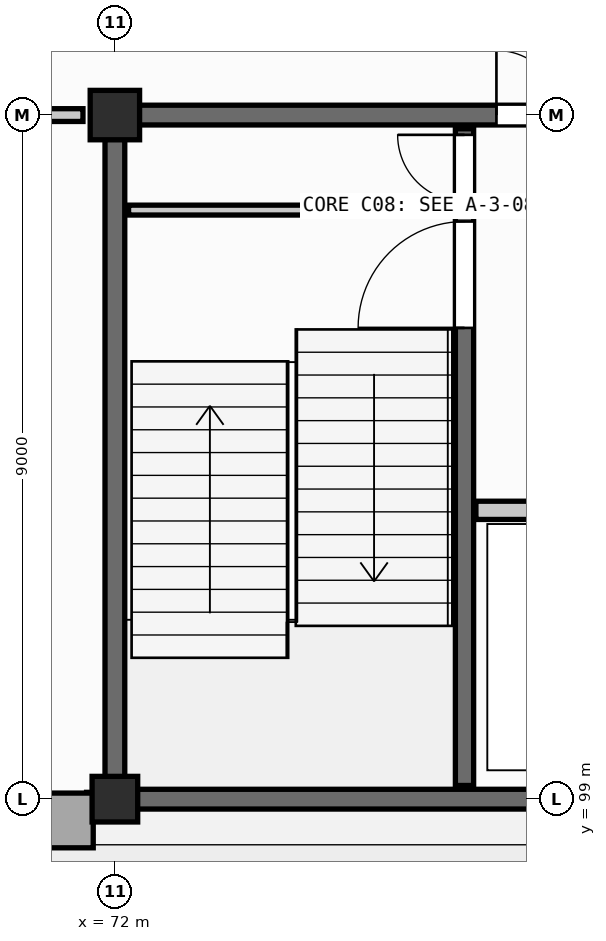
"""IFC4 building model, lengths in metres.
Left out: names, types, materials, properties, quantities, classifications, styles, units other than length and angle.
Written with IfcOpenShell. Run it as: python <this file> out.ifc"""

import sys

from ifc_helpers import new_model, si_unit, direction, frame, frame_2d, origin, origin_2d, place, context, subcontext, project, spatial, rectangle, extrude, element, fill, save


model = new_model("IFC4")
c1 = context("Model", 3, precision=1e-05, world=origin(), true_north=direction((0.0, 1.0)))
c2 = subcontext(c1, "Body", "Model", "MODEL_VIEW")
j1 = project(units=[si_unit("LENGTHUNIT", "METRE"), si_unit("PLANEANGLEUNIT", "RADIAN")], contexts=[c1])
p1 = place(None, origin())
s1 = spatial("IfcSite", under=j1, at=p1, CompositionType="ELEMENT")
p2 = place(p1, origin())
s2 = spatial("IfcBuilding", under=s1, at=p2, CompositionType="ELEMENT")
p3 = place(p2, frame((0.0, 0.0, 9.0)))
s3 = spatial("IfcBuildingStorey", under=s2, at=p3, CompositionType="ELEMENT", Elevation=9.0)
p4 = place(p3, frame((72.0, 99.0, 0.0), z_axis=(0.0, 0.0, 1.0), x_axis=(1.0, 0.0, 0.0)))
e1 = element("IfcColumn", 1, at=p4, inside=s3, PredefinedType="COLUMN", context=c2, shape_type="SweptSolid", body=[
    extrude(rectangle(XDim=0.6, YDim=0.6, at=origin_2d()), origin(), (0.0, 0.0, 1.0), 4.2),
])
p5 = place(p3, frame((72.0, 108.0, 0.0), z_axis=(0.0, 0.0, 1.0), x_axis=(1.0, 0.0, 0.0)))
e2 = element("IfcColumn", 2, at=p5, inside=s3, PredefinedType="COLUMN", context=c2, shape_type="SweptSolid", body=[
    extrude(rectangle(XDim=0.65, YDim=0.65, at=origin_2d()), origin(), (0.0, 0.0, 1.0), 4.2),
])
p6 = place(p3, frame((72.295, 99.0, 0.0), z_axis=(0.0, 0.0, 1.0), x_axis=(1.0, 0.0, 0.0)))
e3 = element("IfcWall", 3, at=p6, inside=s3, PredefinedType="SHEAR", context=c2, shape_type="SweptSolid", body=[
    extrude(rectangle(XDim=7.41, YDim=0.26, at=frame_2d((3.705, 0.0))), origin(), (0.0, 0.0, 1.0), 3.955),
])
p7 = place(p3, frame((72.32, 108.0, 0.0), z_axis=(0.0, 0.0, 1.0), x_axis=(1.0, 0.0, 0.0)))
e4 = element("IfcWall", 4, at=p7, inside=s3, PredefinedType="SHEAR", context=c2, shape_type="SweptSolid", body=[
    extrude(rectangle(XDim=7.36, YDim=0.26, at=frame_2d((3.68, 0.0))), origin(), (0.0, 0.0, 1.0), 3.955),
])
p8 = place(p7, frame((4.7, 0.0, 0.0)))
e5 = element("IfcOpeningElement", 5, at=p8, cuts=e4, PredefinedType="OPENING", context=c2, shape_type="SweptSolid", body=[
    extrude(rectangle(XDim=1.7, YDim=2.25, at=frame_2d((0.85, 1.125))), frame((0.0, 0.14, 0.0), z_axis=(0.0, -1.0, 0.0), x_axis=(1.0, 0.0, 0.0)), (0.0, 0.0, 1.0), 0.28),
])
p9 = place(p3, frame((72.0, 99.295, 0.0), z_axis=(0.0, 0.0, 1.0), x_axis=(0.0, 1.0, 0.0)))
e6 = element("IfcWall", 6, at=p9, inside=s3, PredefinedType="SHEAR", context=c2, shape_type="SweptSolid", body=[
    extrude(rectangle(XDim=8.385, YDim=0.26, at=frame_2d((4.192, 0.0))), origin(), (0.0, 0.0, 1.0), 3.955),
])
p10 = place(p3, frame((76.6, 99.18, 0.0), z_axis=(0.0, 0.0, 1.0), x_axis=(0.0, 1.0, 0.0)))
e7 = element("IfcWall", 7, at=p10, inside=s3, PredefinedType="SHEAR", context=c2, shape_type="SweptSolid", body=[
    extrude(rectangle(XDim=8.64, YDim=0.24, at=frame_2d((4.32, 0.0))), origin(), (0.0, 0.0, 1.0), 3.955),
])
p11 = place(p10, frame((6.02, 0.0, 0.0)))
e8 = element("IfcOpeningElement", 8, at=p11, cuts=e7, PredefinedType="OPENING", context=c2, shape_type="SweptSolid", body=[
    extrude(rectangle(XDim=1.4, YDim=2.2, at=frame_2d((0.7, 1.1))), frame((0.0, 0.13, 0.0), z_axis=(0.0, -1.0, 0.0), x_axis=(1.0, 0.0, 0.0)), (0.0, 0.0, 1.0), 0.26),
])
p12 = place(p10, frame((7.68, 0.0, 0.0)))
e9 = element("IfcOpeningElement", 9, at=p12, cuts=e7, PredefinedType="OPENING", context=c2, shape_type="SweptSolid", body=[
    extrude(rectangle(XDim=0.88, YDim=2.02, at=frame_2d((0.44, 1.01))), frame((0.0, 0.13, 0.0), z_axis=(0.0, -1.0, 0.0), x_axis=(1.0, 0.0, 0.0)), (0.0, 0.0, 1.0), 0.26),
])
p13 = place(p3, frame((72.18, 106.75, 0.0), z_axis=(0.0, 0.0, 1.0), x_axis=(1.0, 0.0, 0.0)))
e10 = element("IfcWall", 10, at=p13, inside=s3, PredefinedType="PARTITIONING", context=c2, shape_type="SweptSolid", body=[
    extrude(rectangle(XDim=4.28, YDim=0.13, at=frame_2d((2.14, 0.0))), origin(), (0.0, 0.0, 1.0), 3.305),
])
p14 = place(p3, frame((76.75, 102.8, 0.0), z_axis=(0.0, 0.0, 1.0), x_axis=(1.0, 0.0, 0.0)))
e11 = element("IfcWall", 11, at=p14, inside=s3, PredefinedType="SHEAR", context=c2, shape_type="SweptSolid", body=[
    extrude(rectangle(XDim=3.07, YDim=0.24, at=frame_2d((1.535, 0.0))), origin(), (0.0, 0.0, 1.0), 3.305),
])
p15 = place(p14, frame((1.035, 0.0, 0.0)))
e12 = element("IfcOpeningElement", 12, at=p15, cuts=e11, PredefinedType="OPENING", context=c2, shape_type="SweptSolid", body=[
    extrude(rectangle(XDim=1.0, YDim=2.15, at=frame_2d((0.5, 1.075))), frame((0.0, 0.13, 0.0), z_axis=(0.0, -1.0, 0.0), x_axis=(1.0, 0.0, 0.0)), (0.0, 0.0, 1.0), 0.26),
])
p16 = place(p3, frame((64.82, 108.0, 0.0), z_axis=(0.0, 0.0, 1.0), x_axis=(1.0, 0.0, 0.0)))
e13 = element("IfcWall", 13, at=p16, inside=s3, PredefinedType="PARTITIONING", context=c2, shape_type="SweptSolid", body=[
    extrude(rectangle(XDim=6.76, YDim=0.168, at=frame_2d((3.38, 0.0))), origin(), (0.0, 0.0, 1.0), 3.05),
])
p17 = place(p16, frame((2.85, 0.0, 0.0)))
e14 = element("IfcOpeningElement", 14, at=p17, cuts=e13, PredefinedType="OPENING", context=c2, shape_type="SweptSolid", body=[
    extrude(rectangle(XDim=1.06, YDim=2.17, at=frame_2d((0.53, 1.085))), frame((0.0, 0.094, 0.0), z_axis=(0.0, -1.0, 0.0), x_axis=(1.0, 0.0, 0.0)), (0.0, 0.0, 1.0), 0.188),
])
p18 = place(p11, origin())
e15 = element("IfcDoor", 15, at=p18, inside=s3, OperationType="SINGLE_SWING_LEFT", PredefinedType="DOOR", context=c2, shape_type="SweptSolid", body=[
    extrude(rectangle(XDim=1.4, YDim=2.2, at=frame_2d((0.7, 1.1))), frame((0.0, 0.025, 0.0), z_axis=(0.0, -1.0, 0.0), x_axis=(1.0, 0.0, 0.0)), (0.0, 0.0, 1.0), 0.05),
])
fill(e8, e15)
p19 = place(p12, origin())
e16 = element("IfcDoor", 16, at=p19, inside=s3, OperationType="SINGLE_SWING_RIGHT", PredefinedType="DOOR", context=c2, shape_type="SweptSolid", body=[
    extrude(rectangle(XDim=0.88, YDim=2.02, at=frame_2d((0.44, 1.01))), frame((0.0, 0.025, 0.0), z_axis=(0.0, -1.0, 0.0), x_axis=(1.0, 0.0, 0.0)), (0.0, 0.0, 1.0), 0.05),
])
fill(e9, e16)
p20 = place(p8, origin())
e17 = element("IfcDoor", 17, at=p20, inside=s3, OperationType="DOUBLE_DOOR_SINGLE_SWING", PredefinedType="DOOR", context=c2, shape_type="SweptSolid", body=[
    extrude(rectangle(XDim=1.7, YDim=2.25, at=frame_2d((0.85, 1.125))), frame((0.0, 0.025, 0.0), z_axis=(0.0, -1.0, 0.0), x_axis=(1.0, 0.0, 0.0)), (0.0, 0.0, 1.0), 0.05),
])
fill(e5, e17)
save(model, sys.argv[1])
